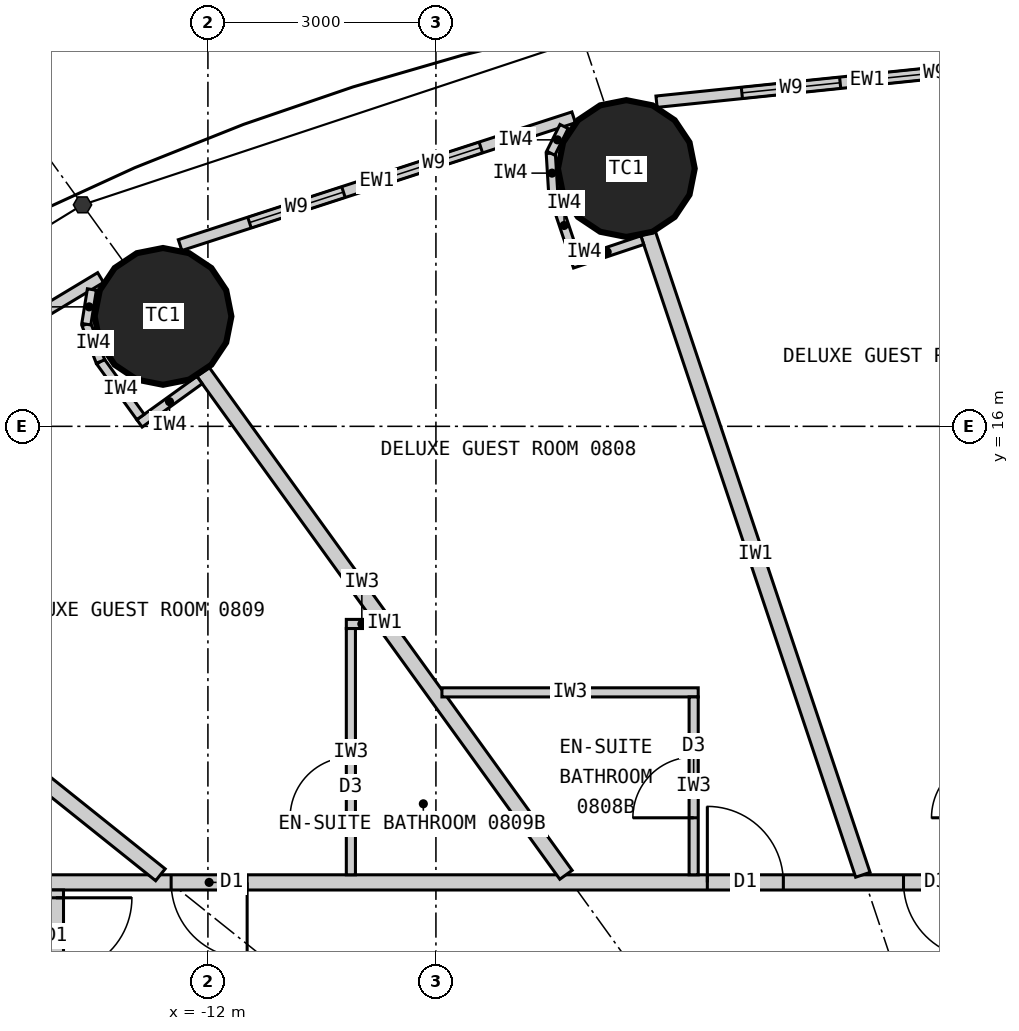
"""IFC4 building model, lengths in metres.
Left out: names, types, materials, properties, quantities, classifications, styles, units other than length and angle.
Written with IfcOpenShell. Run it as: python <this file> out.ifc"""

import sys

from ifc_helpers import new_model, si_unit, direction, frame, frame_2d, origin, origin_2d, place, context, subcontext, project, spatial, rectangle, circle, extrude, element, fill, save


model = new_model("IFC4")
c1 = context("Model", 3, precision=1e-05, world=origin(), true_north=direction((0.0, 1.0)))
c2 = subcontext(c1, "Body", "Model", "MODEL_VIEW")
j1 = project(units=[si_unit("LENGTHUNIT", "METRE"), si_unit("PLANEANGLEUNIT", "RADIAN")], contexts=[c1])
p1 = place(None, origin())
s1 = spatial("IfcSite", under=j1, at=p1, CompositionType="ELEMENT")
p2 = place(p1, origin())
s2 = spatial("IfcBuilding", under=s1, at=p2, CompositionType="ELEMENT")
p3 = place(p2, frame((0.0, 0.0, 39.3)))
s3 = spatial("IfcBuildingStorey", under=s2, at=p3, CompositionType="ELEMENT", Elevation=39.3)
for number, where, z_axis, x_axis in (
    (1, (-6.495, 19.391, 0.0), (0.0, 0.0, 1.0), (1.0, 0.0, 0.0)),
    (2, (-12.591, 17.447, 0.0), (0.0, 0.0, 1.0), (1.0, 0.0, 0.0)),
):
    element("IfcColumn", number, at=place(p3, frame(where, z_axis=z_axis, x_axis=x_axis)), inside=s3, PredefinedType="COLUMN", context=c2, shape_type="SweptSolid", body=[
        extrude(circle(Radius=0.9, at=origin_2d()), origin(), (0.0, 0.0, 1.0), 3.3),
    ])
p4 = place(p3, frame((-0.551, 20.843, 0.0), z_axis=(0.0, 0.0, 1.0), x_axis=(-0.994723735084, -0.102589915983, 0.0)))
e3 = element("IfcWall", 3, at=p4, inside=s3, PredefinedType="ELEMENTEDWALL", context=c2, shape_type="SweptSolid", body=[
    extrude(rectangle(XDim=5.576, YDim=0.15, at=frame_2d((2.788, 0.0))), origin(), (0.0, 0.0, 1.0), 3.12),
])
p5 = place(p4, frame((1.247, 0.0, 0.9)))
e4 = element("IfcOpeningElement", 4, at=p5, cuts=e3, PredefinedType="OPENING", context=c2, shape_type="SweptSolid", body=[
    extrude(rectangle(XDim=1.3, YDim=1.9, at=frame_2d((0.65, 0.95))), frame((0.0, 0.085, 0.0), z_axis=(0.0, -1.0, 0.0), x_axis=(1.0, 0.0, 0.0)), (0.0, 0.0, 1.0), 0.17),
])
p6 = place(p4, frame((3.147, 0.0, 0.9)))
e5 = element("IfcOpeningElement", 5, at=p6, cuts=e3, PredefinedType="OPENING", context=c2, shape_type="SweptSolid", body=[
    extrude(rectangle(XDim=1.3, YDim=1.9, at=frame_2d((0.65, 0.95))), frame((0.0, 0.085, 0.0), z_axis=(0.0, -1.0, 0.0), x_axis=(1.0, 0.0, 0.0)), (0.0, 0.0, 1.0), 0.17),
])
p7 = place(p3, frame((-7.188, 20.065, 0.0), z_axis=(0.0, 0.0, 1.0), x_axis=(-0.951138486029, -0.308764603532, 0.0)))
e6 = element("IfcWall", 6, at=p7, inside=s3, PredefinedType="ELEMENTEDWALL", context=c2, shape_type="SweptSolid", body=[
    extrude(rectangle(XDim=5.444, YDim=0.15, at=frame_2d((2.722, 0.0))), origin(), (0.0, 0.0, 1.0), 3.12),
])
p8 = place(p7, frame((1.284, 0.0, 0.9)))
e7 = element("IfcOpeningElement", 7, at=p8, cuts=e6, PredefinedType="OPENING", context=c2, shape_type="SweptSolid", body=[
    extrude(rectangle(XDim=1.3, YDim=1.9, at=frame_2d((0.65, 0.95))), frame((0.0, 0.085, 0.0), z_axis=(0.0, -1.0, 0.0), x_axis=(1.0, 0.0, 0.0)), (0.0, 0.0, 1.0), 0.17),
])
p9 = place(p7, frame((3.184, 0.0, 0.9)))
e8 = element("IfcOpeningElement", 8, at=p9, cuts=e6, PredefinedType="OPENING", context=c2, shape_type="SweptSolid", body=[
    extrude(rectangle(XDim=1.3, YDim=1.9, at=frame_2d((0.65, 0.95))), frame((0.0, 0.085, 0.0), z_axis=(0.0, -1.0, 0.0), x_axis=(1.0, 0.0, 0.0)), (0.0, 0.0, 1.0), 0.17),
])
p10 = place(p3, frame((-13.412, 17.957, 0.0), z_axis=(0.0, 0.0, 1.0), x_axis=(-0.856958191554, -0.515385931054, 0.0)))
e9 = element("IfcWall", 9, at=p10, inside=s3, PredefinedType="ELEMENTEDWALL", context=c2, shape_type="SweptSolid", body=[
    extrude(rectangle(XDim=5.201, YDim=0.15, at=frame_2d((2.601, 0.0))), origin(), (0.0, 0.0, 1.0), 3.12),
])
p11 = place(p10, frame((1.225, 0.0, 0.9)))
e10 = element("IfcOpeningElement", 10, at=p11, cuts=e9, PredefinedType="OPENING", context=c2, shape_type="SweptSolid", body=[
    extrude(rectangle(XDim=1.3, YDim=1.9, at=frame_2d((0.65, 0.95))), frame((0.0, 0.085, 0.0), z_axis=(0.0, -1.0, 0.0), x_axis=(1.0, 0.0, 0.0)), (0.0, 0.0, 1.0), 0.17),
])
p12 = place(p10, frame((3.125, 0.0, 0.9)))
e11 = element("IfcOpeningElement", 11, at=p12, cuts=e9, PredefinedType="OPENING", context=c2, shape_type="SweptSolid", body=[
    extrude(rectangle(XDim=1.3, YDim=1.9, at=frame_2d((0.65, 0.95))), frame((0.0, 0.085, 0.0), z_axis=(0.0, -1.0, 0.0), x_axis=(1.0, 0.0, 0.0)), (0.0, 0.0, 1.0), 0.17),
])
p13 = place(p3, frame((-14.1, 10.0, 0.0), z_axis=(0.0, 0.0, 1.0), x_axis=(1.0, 0.0, 0.0)))
e12 = element("IfcWall", 12, at=p13, inside=s3, PredefinedType="PARTITIONING", context=c2, shape_type="SweptSolid", body=[
    extrude(rectangle(XDim=28.2, YDim=0.2, at=frame_2d((14.1, 0.0))), origin(), (0.0, 0.0, 1.0), 3.12),
])
p14 = place(p13, frame((23.477, 0.0, 0.0)))
e13 = element("IfcOpeningElement", 13, at=p14, cuts=e12, PredefinedType="OPENING", context=c2, shape_type="SweptSolid", body=[
    extrude(rectangle(XDim=1.0, YDim=2.2, at=frame_2d((0.5, 1.1))), frame((0.0, 0.11, 0.0), z_axis=(0.0, -1.0, 0.0), x_axis=(1.0, 0.0, 0.0)), (0.0, 0.0, 1.0), 0.22),
])
p15 = place(p13, frame((18.529, 0.0, 0.0)))
e14 = element("IfcOpeningElement", 14, at=p15, cuts=e12, PredefinedType="OPENING", context=c2, shape_type="SweptSolid", body=[
    extrude(rectangle(XDim=1.0, YDim=2.2, at=frame_2d((0.5, 1.1))), frame((0.0, 0.11, 0.0), z_axis=(0.0, -1.0, 0.0), x_axis=(1.0, 0.0, 0.0)), (0.0, 0.0, 1.0), 0.22),
])
p16 = place(p13, frame((14.623, 0.0, 0.0)))
e15 = element("IfcOpeningElement", 15, at=p16, cuts=e12, PredefinedType="OPENING", context=c2, shape_type="SweptSolid", body=[
    extrude(rectangle(XDim=1.0, YDim=2.2, at=frame_2d((0.5, 1.1))), frame((0.0, 0.11, 0.0), z_axis=(0.0, -1.0, 0.0), x_axis=(1.0, 0.0, 0.0)), (0.0, 0.0, 1.0), 0.22),
])
p17 = place(p13, frame((11.252, 0.0, 0.0)))
e16 = element("IfcOpeningElement", 16, at=p17, cuts=e12, PredefinedType="OPENING", context=c2, shape_type="SweptSolid", body=[
    extrude(rectangle(XDim=1.0, YDim=2.1, at=frame_2d((0.5, 1.05))), frame((0.0, 0.11, 0.0), z_axis=(0.0, -1.0, 0.0), x_axis=(1.0, 0.0, 0.0)), (0.0, 0.0, 1.0), 0.22),
])
p18 = place(p13, frame((8.671, 0.0, 0.0)))
e17 = element("IfcOpeningElement", 17, at=p18, cuts=e12, PredefinedType="OPENING", context=c2, shape_type="SweptSolid", body=[
    extrude(rectangle(XDim=1.0, YDim=2.2, at=frame_2d((0.5, 1.1))), frame((0.0, 0.11, 0.0), z_axis=(0.0, -1.0, 0.0), x_axis=(1.0, 0.0, 0.0)), (0.0, 0.0, 1.0), 0.22),
])
p19 = place(p13, frame((1.616, 0.0, 0.0)))
e18 = element("IfcOpeningElement", 18, at=p19, cuts=e12, PredefinedType="OPENING", context=c2, shape_type="SweptSolid", body=[
    extrude(rectangle(XDim=1.0, YDim=2.2, at=frame_2d((0.5, 1.1))), frame((0.0, 0.11, 0.0), z_axis=(0.0, -1.0, 0.0), x_axis=(1.0, 0.0, 0.0)), (0.0, 0.0, 1.0), 0.22),
])
p20 = place(p3, frame((-14.0, 9.9, 0.0), z_axis=(0.0, 0.0, 1.0), x_axis=(0.0, -1.0, 0.0)))
e19 = element("IfcWall", 19, at=p20, inside=s3, PredefinedType="PARTITIONING", context=c2, shape_type="SweptSolid", body=[
    extrude(rectangle(XDim=19.8, YDim=0.2, at=frame_2d((9.9, 0.0))), origin(), (0.0, 0.0, 1.0), 3.12),
])
p21 = place(p20, frame((0.103, 0.0, 0.0)))
e20 = element("IfcOpeningElement", 20, at=p21, cuts=e19, PredefinedType="OPENING", context=c2, shape_type="SweptSolid", body=[
    extrude(rectangle(XDim=1.0, YDim=2.2, at=frame_2d((0.5, 1.1))), frame((0.0, 0.11, 0.0), z_axis=(0.0, -1.0, 0.0), x_axis=(1.0, 0.0, 0.0)), (0.0, 0.0, 1.0), 0.22),
])
p22 = place(p20, frame((5.252, 0.0, 0.0)))
e21 = element("IfcOpeningElement", 21, at=p22, cuts=e19, PredefinedType="OPENING", context=c2, shape_type="SweptSolid", body=[
    extrude(rectangle(XDim=1.0, YDim=2.0, at=frame_2d((0.5, 1.0))), frame((0.0, 0.11, 0.0), z_axis=(0.0, -1.0, 0.0), x_axis=(1.0, 0.0, 0.0)), (0.0, 0.0, 1.0), 0.22),
])
p23 = place(p20, frame((10.117, 0.0, 0.0)))
e22 = element("IfcOpeningElement", 22, at=p23, cuts=e19, PredefinedType="OPENING", context=c2, shape_type="SweptSolid", body=[
    extrude(rectangle(XDim=1.0, YDim=2.2, at=frame_2d((0.5, 1.1))), frame((0.0, 0.11, 0.0), z_axis=(0.0, -1.0, 0.0), x_axis=(1.0, 0.0, 0.0)), (0.0, 0.0, 1.0), 0.22),
])
p24 = place(p20, frame((13.247, 0.0, 0.0)))
e23 = element("IfcOpeningElement", 23, at=p24, cuts=e19, PredefinedType="OPENING", context=c2, shape_type="SweptSolid", body=[
    extrude(rectangle(XDim=1.0, YDim=2.0, at=frame_2d((0.5, 1.0))), frame((0.0, 0.11, 0.0), z_axis=(0.0, -1.0, 0.0), x_axis=(1.0, 0.0, 0.0)), (0.0, 0.0, 1.0), 0.22),
])
p25 = place(p20, frame((15.679, 0.0, 0.0)))
e24 = element("IfcOpeningElement", 24, at=p25, cuts=e19, PredefinedType="OPENING", context=c2, shape_type="SweptSolid", body=[
    extrude(rectangle(XDim=1.0, YDim=2.2, at=frame_2d((0.5, 1.1))), frame((0.0, 0.11, 0.0), z_axis=(0.0, -1.0, 0.0), x_axis=(1.0, 0.0, 0.0)), (0.0, 0.0, 1.0), 0.22),
])
p26 = place(p3, frame((-3.383, 10.1, 0.0), z_axis=(0.0, 0.0, 1.0), x_axis=(-0.317593727596, 0.948226884344, 0.0)))
e25 = element("IfcWall", 25, at=p26, inside=s3, PredefinedType="PARTITIONING", context=c2, shape_type="SweptSolid", body=[
    extrude(rectangle(XDim=8.899, YDim=0.2, at=frame_2d((4.449, 0.0))), origin(), (0.0, 0.0, 1.0), 2.32),
])
p27 = place(p3, frame((-7.289, 10.1, 0.0), z_axis=(0.0, 0.0, 1.0), x_axis=(-0.585216319319, 0.810877216108, 0.0)))
e26 = element("IfcWall", 26, at=p27, inside=s3, PredefinedType="PARTITIONING", context=c2, shape_type="SweptSolid", body=[
    extrude(rectangle(XDim=8.16, YDim=0.2, at=frame_2d((4.08, 0.0))), origin(), (0.0, 0.0, 1.0), 2.32),
])
p28 = place(p3, frame((-12.625, 10.1, 0.0), z_axis=(0.0, 0.0, 1.0), x_axis=(-0.780872884676, 0.624689953479, 0.0)))
e27 = element("IfcWall", 27, at=p28, inside=s3, PredefinedType="PARTITIONING", context=c2, shape_type="SweptSolid", body=[
    extrude(rectangle(XDim=5.845, YDim=0.2, at=frame_2d((2.922, 0.0))), origin(), (0.0, 0.0, 1.0), 2.32),
])
p29 = place(p3, frame((-8.921, 12.5, 0.0), z_axis=(0.0, 0.0, 1.0), x_axis=(1.0, 0.0, 0.0)))
e28 = element("IfcWall", 28, at=p29, inside=s3, PredefinedType="PARTITIONING", context=c2, shape_type="SweptSolid", body=[
    extrude(rectangle(XDim=3.372, YDim=0.12, at=frame_2d((1.686, 0.0))), origin(), (0.0, 0.0, 1.0), 3.12),
])
p30 = place(p3, frame((-5.609, 10.1, 0.0), z_axis=(0.0, 0.0, 1.0), x_axis=(0.0, 1.0, 0.0)))
e29 = element("IfcWall", 29, at=p30, inside=s3, PredefinedType="PARTITIONING", context=c2, shape_type="SweptSolid", body=[
    extrude(rectangle(XDim=2.34, YDim=0.12, at=frame_2d((1.17, 0.0))), origin(), (0.0, 0.0, 1.0), 3.12),
])
p31 = place(p30, frame((0.75, 0.0, 0.0)))
e30 = element("IfcOpeningElement", 30, at=p31, cuts=e29, PredefinedType="OPENING", context=c2, shape_type="SweptSolid", body=[
    extrude(rectangle(XDim=0.8, YDim=2.1, at=frame_2d((0.4, 1.05))), frame((0.0, 0.07, 0.0), z_axis=(0.0, -1.0, 0.0), x_axis=(1.0, 0.0, 0.0)), (0.0, 0.0, 1.0), 0.14),
])
p32 = place(p3, frame((-9.771, 13.4, 0.0), z_axis=(0.0, 0.0, 1.0), x_axis=(-1.0, 0.0, 0.0)))
e31 = element("IfcWall", 31, at=p32, inside=s3, PredefinedType="PARTITIONING", context=c2, shape_type="SweptSolid", body=[
    extrude(rectangle(XDim=0.408, YDim=0.12, at=frame_2d((0.204, 0.0))), origin(), (0.0, 0.0, 1.0), 3.12),
])
p33 = place(p3, frame((-10.119, 10.1, 0.0), z_axis=(0.0, 0.0, 1.0), x_axis=(0.0, 1.0, 0.0)))
e32 = element("IfcWall", 32, at=p33, inside=s3, PredefinedType="PARTITIONING", context=c2, shape_type="SweptSolid", body=[
    extrude(rectangle(XDim=3.24, YDim=0.12, at=frame_2d((1.62, 0.0))), origin(), (0.0, 0.0, 1.0), 3.12),
])
p34 = place(p33, frame((0.75, 0.0, 0.0)))
e33 = element("IfcOpeningElement", 33, at=p34, cuts=e32, PredefinedType="OPENING", context=c2, shape_type="SweptSolid", body=[
    extrude(rectangle(XDim=0.8, YDim=2.1, at=frame_2d((0.4, 1.05))), frame((0.0, 0.07, 0.0), z_axis=(0.0, -1.0, 0.0), x_axis=(1.0, 0.0, 0.0)), (0.0, 0.0, 1.0), 0.14),
])
p35 = place(p3, frame((-6.285, 18.449, 0.0), z_axis=(0.0, 0.0, 1.0), x_axis=(-0.948281677008, -0.317430088446, 0.0)))
e34 = element("IfcWall", 34, at=p35, inside=s3, PredefinedType="PARTITIONING", context=c2, shape_type="SweptSolid", body=[
    extrude(rectangle(XDim=0.974, YDim=0.12, at=frame_2d((0.487, 0.0))), origin(), (0.0, 0.0, 1.0), 3.12),
])
p36 = place(p3, frame((-7.171, 18.216, 0.0), z_axis=(0.0, 0.0, 1.0), x_axis=(-0.317692409458, 0.94819382669, 0.0)))
e35 = element("IfcWall", 35, at=p36, inside=s3, PredefinedType="PARTITIONING", context=c2, shape_type="SweptSolid", body=[
    extrude(rectangle(XDim=0.9, YDim=0.12, at=frame_2d((0.45, 0.0))), origin(), (0.0, 0.0, 1.0), 3.12),
])
p37 = place(p3, frame((-7.457, 19.069, 0.0), z_axis=(0.0, 0.0, 1.0), x_axis=(-0.061365267648, 0.99811537606, 0.0)))
e36 = element("IfcWall", 36, at=p37, inside=s3, PredefinedType="PARTITIONING", context=c2, shape_type="SweptSolid", body=[
    extrude(rectangle(XDim=0.525, YDim=0.12, at=frame_2d((0.263, 0.0))), origin(), (0.0, 0.0, 1.0), 3.12),
])
p38 = place(p3, frame((-7.489, 19.593, 0.0), z_axis=(0.0, 0.0, 1.0), x_axis=(0.446218959337, 0.89492381817, 0.0)))
e37 = element("IfcWall", 37, at=p38, inside=s3, PredefinedType="PARTITIONING", context=c2, shape_type="SweptSolid", body=[
    extrude(rectangle(XDim=0.393, YDim=0.12, at=frame_2d((0.196, 0.0))), origin(), (0.0, 0.0, 1.0), 3.12),
])
p39 = place(p3, frame((-12.11, 16.609, 0.0), z_axis=(0.0, 0.0, 1.0), x_axis=(-0.810897160646, -0.585188683123, 0.0)))
e38 = element("IfcWall", 38, at=p39, inside=s3, PredefinedType="PARTITIONING", context=c2, shape_type="SweptSolid", body=[
    extrude(rectangle(XDim=0.975, YDim=0.12, at=frame_2d((0.487, 0.0))), origin(), (0.0, 0.0, 1.0), 3.12),
])
p40 = place(p3, frame((-12.887, 16.123, 0.0), z_axis=(0.0, 0.0, 1.0), x_axis=(-0.585054732094, 0.810993810367, 0.0)))
e39 = element("IfcWall", 39, at=p40, inside=s3, PredefinedType="PARTITIONING", context=c2, shape_type="SweptSolid", body=[
    extrude(rectangle(XDim=0.9, YDim=0.12, at=frame_2d((0.45, 0.0))), origin(), (0.0, 0.0, 1.0), 3.12),
])
p41 = place(p3, frame((-13.414, 16.853, 0.0), z_axis=(0.0, 0.0, 1.0), x_axis=(-0.355705277023, 0.934598178844, 0.0)))
e40 = element("IfcWall", 40, at=p41, inside=s3, PredefinedType="PARTITIONING", context=c2, shape_type="SweptSolid", body=[
    extrude(rectangle(XDim=0.525, YDim=0.12, at=frame_2d((0.263, 0.0))), origin(), (0.0, 0.0, 1.0), 3.12),
])
p42 = place(p3, frame((-13.6, 17.344, 0.0), z_axis=(0.0, 0.0, 1.0), x_axis=(0.15994604532, 0.987125758243, 0.0)))
e41 = element("IfcWall", 41, at=p42, inside=s3, PredefinedType="PARTITIONING", context=c2, shape_type="SweptSolid", body=[
    extrude(rectangle(XDim=0.462, YDim=0.12, at=frame_2d((0.231, 0.0))), origin(), (0.0, 0.0, 1.0), 3.12),
])
p43 = place(p5, origin())
e42 = element("IfcWindow", 42, at=p43, inside=s3, PartitioningType="SINGLE_PANEL", PredefinedType="WINDOW", context=c2, shape_type="SweptSolid", body=[
    extrude(rectangle(XDim=1.3, YDim=1.9, at=frame_2d((0.65, 0.95))), frame((0.0, 0.03, 0.0), z_axis=(0.0, -1.0, 0.0), x_axis=(1.0, 0.0, 0.0)), (0.0, 0.0, 1.0), 0.06),
])
fill(e4, e42)
p44 = place(p6, origin())
e43 = element("IfcWindow", 43, at=p44, inside=s3, PartitioningType="SINGLE_PANEL", PredefinedType="WINDOW", context=c2, shape_type="SweptSolid", body=[
    extrude(rectangle(XDim=1.3, YDim=1.9, at=frame_2d((0.65, 0.95))), frame((0.0, 0.03, 0.0), z_axis=(0.0, -1.0, 0.0), x_axis=(1.0, 0.0, 0.0)), (0.0, 0.0, 1.0), 0.06),
])
fill(e5, e43)
p45 = place(p8, origin())
e44 = element("IfcWindow", 44, at=p45, inside=s3, PartitioningType="SINGLE_PANEL", PredefinedType="WINDOW", context=c2, shape_type="SweptSolid", body=[
    extrude(rectangle(XDim=1.3, YDim=1.9, at=frame_2d((0.65, 0.95))), frame((0.0, 0.03, 0.0), z_axis=(0.0, -1.0, 0.0), x_axis=(1.0, 0.0, 0.0)), (0.0, 0.0, 1.0), 0.06),
])
fill(e7, e44)
p46 = place(p9, origin())
e45 = element("IfcWindow", 45, at=p46, inside=s3, PartitioningType="SINGLE_PANEL", PredefinedType="WINDOW", context=c2, shape_type="SweptSolid", body=[
    extrude(rectangle(XDim=1.3, YDim=1.9, at=frame_2d((0.65, 0.95))), frame((0.0, 0.03, 0.0), z_axis=(0.0, -1.0, 0.0), x_axis=(1.0, 0.0, 0.0)), (0.0, 0.0, 1.0), 0.06),
])
fill(e8, e45)
p47 = place(p17, origin())
e46 = element("IfcDoor", 46, at=p47, inside=s3, OperationType="SINGLE_SWING_RIGHT", PredefinedType="DOOR", context=c2, shape_type="SweptSolid", body=[
    extrude(rectangle(XDim=1.0, YDim=2.1, at=frame_2d((0.5, 1.05))), frame((0.0, 0.025, 0.0), z_axis=(0.0, -1.0, 0.0), x_axis=(1.0, 0.0, 0.0)), (0.0, 0.0, 1.0), 0.05),
])
fill(e16, e46)
p48 = place(p31, origin())
e47 = element("IfcDoor", 47, at=p48, inside=s3, OperationType="SINGLE_SWING_LEFT", PredefinedType="DOOR", context=c2, shape_type="SweptSolid", body=[
    extrude(rectangle(XDim=0.8, YDim=2.1, at=frame_2d((0.4, 1.05))), frame((0.0, 0.025, 0.0), z_axis=(0.0, -1.0, 0.0), x_axis=(1.0, 0.0, 0.0)), (0.0, 0.0, 1.0), 0.05),
])
fill(e30, e47)
p49 = place(p18, origin())
e48 = element("IfcDoor", 48, at=p49, inside=s3, OperationType="SINGLE_SWING_LEFT", PredefinedType="DOOR", context=c2, shape_type="SweptSolid", body=[
    extrude(rectangle(XDim=1.0, YDim=2.2, at=frame_2d((0.5, 1.1))), frame((0.0, 0.025, 0.0), z_axis=(0.0, -1.0, 0.0), x_axis=(1.0, 0.0, 0.0)), (0.0, 0.0, 1.0), 0.05),
])
fill(e17, e48)
p50 = place(p34, origin())
e49 = element("IfcDoor", 49, at=p50, inside=s3, OperationType="SINGLE_SWING_LEFT", PredefinedType="DOOR", context=c2, shape_type="SweptSolid", body=[
    extrude(rectangle(XDim=0.8, YDim=2.1, at=frame_2d((0.4, 1.05))), frame((0.0, 0.025, 0.0), z_axis=(0.0, -1.0, 0.0), x_axis=(1.0, 0.0, 0.0)), (0.0, 0.0, 1.0), 0.05),
])
fill(e33, e49)
p51 = place(p19, origin())
e50 = element("IfcDoor", 50, at=p51, inside=s3, OperationType="SINGLE_SWING_RIGHT", PredefinedType="DOOR", context=c2, shape_type="SweptSolid", body=[
    extrude(rectangle(XDim=1.0, YDim=2.2, at=frame_2d((0.5, 1.1))), frame((0.0, 0.025, 0.0), z_axis=(0.0, -1.0, 0.0), x_axis=(1.0, 0.0, 0.0)), (0.0, 0.0, 1.0), 0.05),
])
fill(e18, e50)
p52 = place(p21, origin())
e51 = element("IfcDoor", 51, at=p52, inside=s3, OperationType="SINGLE_SWING_LEFT", PredefinedType="DOOR", context=c2, shape_type="SweptSolid", body=[
    extrude(rectangle(XDim=1.0, YDim=2.2, at=frame_2d((0.5, 1.1))), frame((0.0, 0.025, 0.0), z_axis=(0.0, -1.0, 0.0), x_axis=(1.0, 0.0, 0.0)), (0.0, 0.0, 1.0), 0.05),
])
fill(e20, e51)
save(model, sys.argv[1])
